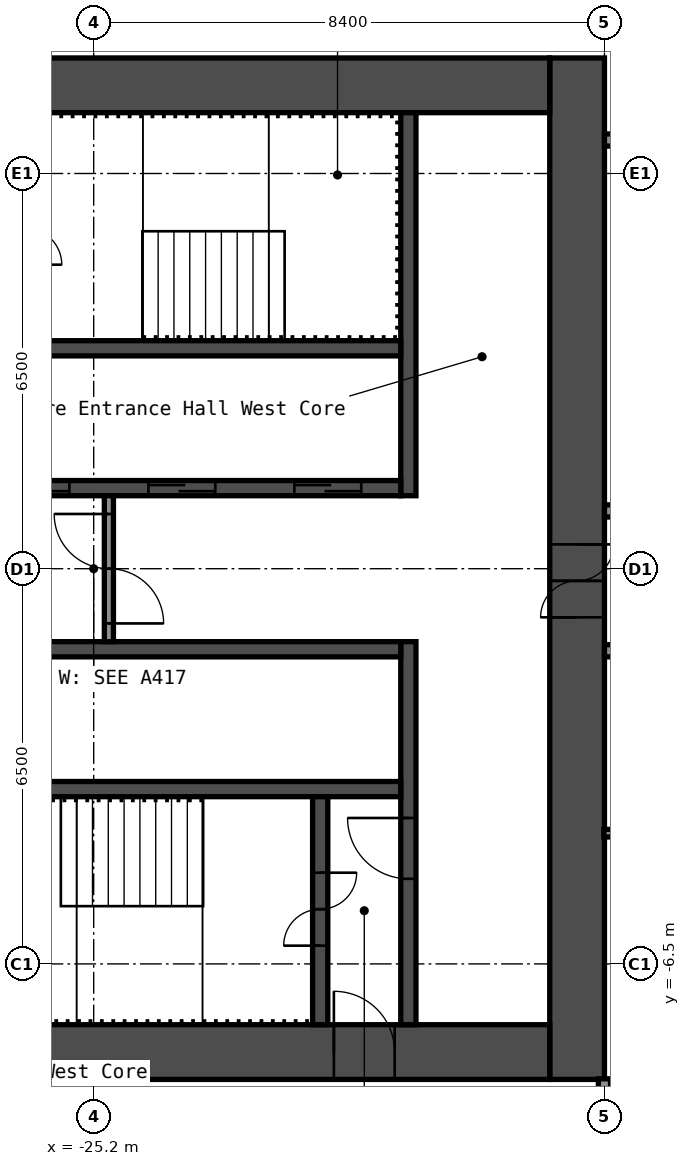
"""IFC4 building model, lengths in metres.
Left out: names, types, materials, properties, quantities, classifications, styles, units other than length and angle.
Written with IfcOpenShell. Run it as: python <this file> out.ifc"""

import sys

from ifc_helpers import new_model, si_unit, direction, frame, frame_2d, origin, place, context, subcontext, project, spatial, rectangle, extrude, element, fill, save


model = new_model("IFC4")
c1 = context("Model", 3, precision=1e-05, world=origin(), true_north=direction((0.0, 1.0)))
c2 = subcontext(c1, "Body", "Model", "MODEL_VIEW")
j1 = project(units=[si_unit("LENGTHUNIT", "METRE"), si_unit("PLANEANGLEUNIT", "RADIAN")], contexts=[c1])
p1 = place(None, origin())
s1 = spatial("IfcSite", under=j1, at=p1, CompositionType="ELEMENT")
p2 = place(p1, origin())
s2 = spatial("IfcBuilding", under=s1, at=p2, CompositionType="ELEMENT")
p3 = place(p2, frame((0.0, 0.0, 117.0)))
s3 = spatial("IfcBuildingStorey", under=s2, at=p3, CompositionType="ELEMENT", Elevation=117.0)
p4 = place(p3, frame((-17.25, -8.4, 0.0), z_axis=(0.0, 0.0, 1.0), x_axis=(0.0, 1.0, 0.0)))
e1 = element("IfcWall", 1, at=p4, inside=s3, PredefinedType="SHEAR", context=c2, shape_type="SweptSolid", body=[
    extrude(rectangle(XDim=16.8, YDim=0.9, at=frame_2d((8.4, 0.0))), origin(), (0.0, 0.0, 1.0), 2.9),
])
p5 = place(p4, frame((7.6, 0.0, 0.0)))
e2 = element("IfcOpeningElement", 2, at=p5, cuts=e1, PredefinedType="OPENING", context=c2, shape_type="SweptSolid", body=[
    extrude(rectangle(XDim=1.2, YDim=2.1, at=frame_2d((0.6, 1.05))), frame((0.0, 0.46, 0.0), z_axis=(0.0, -1.0, 0.0), x_axis=(1.0, 0.0, 0.0)), (0.0, 0.0, 1.0), 0.92),
])
p6 = place(p3, frame((-32.7, 7.95, 0.0), z_axis=(0.0, 0.0, 1.0), x_axis=(1.0, 0.0, 0.0)))
e3 = element("IfcWall", 3, at=p6, inside=s3, PredefinedType="SHEAR", context=c2, shape_type="SweptSolid", body=[
    extrude(rectangle(XDim=15.0, YDim=0.9, at=frame_2d((7.5, 0.0))), origin(), (0.0, 0.0, 1.0), 2.9),
])
p7 = place(p6, frame((3.4, 0.0, 0.0)))
e4 = element("IfcOpeningElement", 4, at=p7, cuts=e3, PredefinedType="OPENING", context=c2, shape_type="SweptSolid", body=[
    extrude(rectangle(XDim=1.2, YDim=2.1, at=frame_2d((0.6, 1.05))), frame((0.0, 0.46, 0.0), z_axis=(0.0, -1.0, 0.0), x_axis=(1.0, 0.0, 0.0)), (0.0, 0.0, 1.0), 0.92),
])
p8 = place(p6, frame((0.75, 0.0, 0.0)))
e5 = element("IfcOpeningElement", 5, at=p8, cuts=e3, PredefinedType="OPENING", context=c2, shape_type="SweptSolid", body=[
    extrude(rectangle(XDim=0.9, YDim=2.1, at=frame_2d((0.45, 1.05))), frame((0.0, 0.46, 0.0), z_axis=(0.0, -1.0, 0.0), x_axis=(1.0, 0.0, 0.0)), (0.0, 0.0, 1.0), 0.92),
])
p9 = place(p3, frame((-32.7, -7.95, 0.0), z_axis=(0.0, 0.0, 1.0), x_axis=(1.0, 0.0, 0.0)))
e6 = element("IfcWall", 6, at=p9, inside=s3, PredefinedType="SHEAR", context=c2, shape_type="SweptSolid", body=[
    extrude(rectangle(XDim=15.0, YDim=0.9, at=frame_2d((7.5, 0.0))), origin(), (0.0, 0.0, 1.0), 2.9),
])
p10 = place(p9, frame((11.45, 0.0, 0.0)))
e7 = element("IfcOpeningElement", 7, at=p10, cuts=e6, PredefinedType="OPENING", context=c2, shape_type="SweptSolid", body=[
    extrude(rectangle(XDim=1.0, YDim=2.1, at=frame_2d((0.5, 1.05))), frame((0.0, 0.46, 0.0), z_axis=(0.0, -1.0, 0.0), x_axis=(1.0, 0.0, 0.0)), (0.0, 0.0, 1.0), 0.92),
])
p11 = place(p3, frame((-20.025, 1.2, 0.0), z_axis=(0.0, 0.0, 1.0), x_axis=(0.0, 1.0, 0.0)))
e8 = element("IfcWall", 8, at=p11, inside=s3, PredefinedType="SHEAR", context=c2, shape_type="SweptSolid", body=[
    extrude(rectangle(XDim=6.3, YDim=0.25, at=frame_2d((3.15, 0.0))), origin(), (0.0, 0.0, 1.0), 2.9),
])
p12 = place(p3, frame((-20.025, -7.5, 0.0), z_axis=(0.0, 0.0, 1.0), x_axis=(0.0, 1.0, 0.0)))
e9 = element("IfcWall", 9, at=p12, inside=s3, PredefinedType="SHEAR", context=c2, shape_type="SweptSolid", body=[
    extrude(rectangle(XDim=6.3, YDim=0.25, at=frame_2d((3.15, 0.0))), origin(), (0.0, 0.0, 1.0), 2.9),
])
p13 = place(p12, frame((2.4, 0.0, 0.0)))
e10 = element("IfcOpeningElement", 10, at=p13, cuts=e9, PredefinedType="OPENING", context=c2, shape_type="SweptSolid", body=[
    extrude(rectangle(XDim=1.0, YDim=2.1, at=frame_2d((0.5, 1.05))), frame((0.0, 0.135, 0.0), z_axis=(0.0, -1.0, 0.0), x_axis=(1.0, 0.0, 0.0)), (0.0, 0.0, 1.0), 0.27),
])
p14 = place(p3, frame((-27.65, 1.325, 0.0), z_axis=(0.0, 0.0, 1.0), x_axis=(1.0, 0.0, 0.0)))
e11 = element("IfcWall", 11, at=p14, inside=s3, PredefinedType="SHEAR", context=c2, shape_type="SweptSolid", body=[
    extrude(rectangle(XDim=7.5, YDim=0.25, at=frame_2d((3.75, 0.0))), origin(), (0.0, 0.0, 1.0), 2.9),
])
p15 = place(p14, frame((5.75, 0.0, 0.0)))
e12 = element("IfcOpeningElement", 12, at=p15, cuts=e11, PredefinedType="OPENING", context=c2, shape_type="SweptSolid", body=[
    extrude(rectangle(XDim=1.1, YDim=2.1, at=frame_2d((0.55, 1.05))), frame((0.0, 0.135, 0.0), z_axis=(0.0, -1.0, 0.0), x_axis=(1.0, 0.0, 0.0)), (0.0, 0.0, 1.0), 0.27),
])
p16 = place(p14, frame((3.35, 0.0, 0.0)))
e13 = element("IfcOpeningElement", 13, at=p16, cuts=e11, PredefinedType="OPENING", context=c2, shape_type="SweptSolid", body=[
    extrude(rectangle(XDim=1.1, YDim=2.1, at=frame_2d((0.55, 1.05))), frame((0.0, 0.135, 0.0), z_axis=(0.0, -1.0, 0.0), x_axis=(1.0, 0.0, 0.0)), (0.0, 0.0, 1.0), 0.27),
])
p17 = place(p14, frame((0.95, 0.0, 0.0)))
e14 = element("IfcOpeningElement", 14, at=p17, cuts=e11, PredefinedType="OPENING", context=c2, shape_type="SweptSolid", body=[
    extrude(rectangle(XDim=1.1, YDim=2.1, at=frame_2d((0.55, 1.05))), frame((0.0, 0.135, 0.0), z_axis=(0.0, -1.0, 0.0), x_axis=(1.0, 0.0, 0.0)), (0.0, 0.0, 1.0), 0.27),
])
for number, where, z_axis, x_axis in (
    (15, (-27.65, 3.625, 0.0), (0.0, 0.0, 1.0), (1.0, 0.0, 0.0)),
    (16, (-27.65, -1.325, 0.0), (0.0, 0.0, 1.0), (1.0, 0.0, 0.0)),
    (17, (-27.65, -3.625, 0.0), (0.0, 0.0, 1.0), (1.0, 0.0, 0.0)),
):
    element("IfcWall", number, at=place(p3, frame(where, z_axis=z_axis, x_axis=x_axis)), inside=s3, PredefinedType="SHEAR", context=c2, shape_type="SweptSolid", body=[
        extrude(rectangle(XDim=7.5, YDim=0.25, at=frame_2d((3.75, 0.0))), origin(), (0.0, 0.0, 1.0), 2.9),
    ])
p18 = place(p3, frame((-21.475, -7.5, 0.0), z_axis=(0.0, 0.0, 1.0), x_axis=(0.0, 1.0, 0.0)))
e18 = element("IfcWall", 18, at=p18, inside=s3, PredefinedType="SHEAR", context=c2, shape_type="SweptSolid", body=[
    extrude(rectangle(XDim=3.75, YDim=0.25, at=frame_2d((1.875, 0.0))), origin(), (0.0, 0.0, 1.0), 2.9),
])
p19 = place(p18, frame((1.3, 0.0, 0.0)))
e19 = element("IfcOpeningElement", 19, at=p19, cuts=e18, PredefinedType="OPENING", context=c2, shape_type="SweptSolid", body=[
    extrude(rectangle(XDim=1.2, YDim=2.1, at=frame_2d((0.6, 1.05))), frame((0.0, 0.135, 0.0), z_axis=(0.0, -1.0, 0.0), x_axis=(1.0, 0.0, 0.0)), (0.0, 0.0, 1.0), 0.27),
])
p20 = place(p3, frame((-24.95, -1.2, 0.0), z_axis=(0.0, 0.0, 1.0), x_axis=(0.0, 1.0, 0.0)))
e20 = element("IfcWall", 20, at=p20, inside=s3, PredefinedType="PARTITIONING", context=c2, shape_type="SweptSolid", body=[
    extrude(rectangle(XDim=2.4, YDim=0.15, at=frame_2d((1.2, 0.0))), origin(), (0.0, 0.0, 1.0), 2.9),
])
p21 = place(p20, frame((0.3, 0.0, 0.0)))
e21 = element("IfcOpeningElement", 21, at=p21, cuts=e20, PredefinedType="OPENING", context=c2, shape_type="SweptSolid", body=[
    extrude(rectangle(XDim=1.8, YDim=2.1, at=frame_2d((0.9, 1.05))), frame((0.0, 0.085, 0.0), z_axis=(0.0, -1.0, 0.0), x_axis=(1.0, 0.0, 0.0)), (0.0, 0.0, 1.0), 0.17),
])
p22 = place(p3, frame((-16.81, -4.35, 0.0), z_axis=(0.0, 0.0, 1.0), x_axis=(1.0, 0.0, 0.0)))
e22 = element("IfcWall", 22, at=p22, inside=s3, PredefinedType="PARTITIONING", context=c2, shape_type="SweptSolid", body=[
    extrude(rectangle(XDim=2.448, YDim=0.125, at=frame_2d((1.224, 0.0))), origin(), (0.0, 0.0, 1.0), 2.9),
])
p23 = place(p3, frame((-16.8, -1.35, 0.0), z_axis=(0.0, 0.0, 1.0), x_axis=(1.0, 0.0, 0.0)))
e23 = element("IfcWall", 23, at=p23, inside=s3, PredefinedType="PARTITIONING", context=c2, shape_type="SweptSolid", body=[
    extrude(rectangle(XDim=33.6, YDim=0.2, at=frame_2d((16.8, 0.0))), origin(), (0.0, 0.0, 1.0), 2.9),
])
p24 = place(p23, frame((2.85, 0.0, 0.0)))
e24 = element("IfcOpeningElement", 24, at=p24, cuts=e23, PredefinedType="OPENING", context=c2, shape_type="SweptSolid", body=[
    extrude(rectangle(XDim=1.0, YDim=2.1, at=frame_2d((0.5, 1.05))), frame((0.0, 0.11, 0.0), z_axis=(0.0, -1.0, 0.0), x_axis=(1.0, 0.0, 0.0)), (0.0, 0.0, 1.0), 0.22),
])
p25 = place(p23, frame((4.55, 0.0, 0.0)))
e25 = element("IfcOpeningElement", 25, at=p25, cuts=e23, PredefinedType="OPENING", context=c2, shape_type="SweptSolid", body=[
    extrude(rectangle(XDim=1.0, YDim=2.1, at=frame_2d((0.5, 1.05))), frame((0.0, 0.11, 0.0), z_axis=(0.0, -1.0, 0.0), x_axis=(1.0, 0.0, 0.0)), (0.0, 0.0, 1.0), 0.22),
])
p26 = place(p23, frame((9.88, 0.0, 0.0)))
e26 = element("IfcOpeningElement", 26, at=p26, cuts=e23, PredefinedType="OPENING", context=c2, shape_type="SweptSolid", body=[
    extrude(rectangle(XDim=0.9, YDim=2.1, at=frame_2d((0.45, 1.05))), frame((0.0, 0.11, 0.0), z_axis=(0.0, -1.0, 0.0), x_axis=(1.0, 0.0, 0.0)), (0.0, 0.0, 1.0), 0.22),
])
p27 = place(p23, frame((14.08, 0.0, 0.0)))
e27 = element("IfcOpeningElement", 27, at=p27, cuts=e23, PredefinedType="OPENING", context=c2, shape_type="SweptSolid", body=[
    extrude(rectangle(XDim=0.9, YDim=2.1, at=frame_2d((0.45, 1.05))), frame((0.0, 0.11, 0.0), z_axis=(0.0, -1.0, 0.0), x_axis=(1.0, 0.0, 0.0)), (0.0, 0.0, 1.0), 0.22),
])
p28 = place(p23, frame((19.65, 0.0, 0.0)))
e28 = element("IfcOpeningElement", 28, at=p28, cuts=e23, PredefinedType="OPENING", context=c2, shape_type="SweptSolid", body=[
    extrude(rectangle(XDim=1.0, YDim=2.1, at=frame_2d((0.5, 1.05))), frame((0.0, 0.11, 0.0), z_axis=(0.0, -1.0, 0.0), x_axis=(1.0, 0.0, 0.0)), (0.0, 0.0, 1.0), 0.22),
])
p29 = place(p23, frame((21.35, 0.0, 0.0)))
e29 = element("IfcOpeningElement", 29, at=p29, cuts=e23, PredefinedType="OPENING", context=c2, shape_type="SweptSolid", body=[
    extrude(rectangle(XDim=1.0, YDim=2.1, at=frame_2d((0.5, 1.05))), frame((0.0, 0.11, 0.0), z_axis=(0.0, -1.0, 0.0), x_axis=(1.0, 0.0, 0.0)), (0.0, 0.0, 1.0), 0.22),
])
p30 = place(p23, frame((27.2, 0.0, 0.0)))
e30 = element("IfcOpeningElement", 30, at=p30, cuts=e23, PredefinedType="OPENING", context=c2, shape_type="SweptSolid", body=[
    extrude(rectangle(XDim=1.0, YDim=2.1, at=frame_2d((0.5, 1.05))), frame((0.0, 0.11, 0.0), z_axis=(0.0, -1.0, 0.0), x_axis=(1.0, 0.0, 0.0)), (0.0, 0.0, 1.0), 0.22),
])
p31 = place(p3, frame((-16.8, 0.95, 0.0), z_axis=(0.0, 0.0, 1.0), x_axis=(1.0, 0.0, 0.0)))
e31 = element("IfcWall", 31, at=p31, inside=s3, PredefinedType="PARTITIONING", context=c2, shape_type="SweptSolid", body=[
    extrude(rectangle(XDim=33.6, YDim=0.2, at=frame_2d((16.8, 0.0))), origin(), (0.0, 0.0, 1.0), 2.9),
])
p32 = place(p31, frame((10.47, 0.0, 0.0)))
e32 = element("IfcOpeningElement", 32, at=p32, cuts=e31, PredefinedType="OPENING", context=c2, shape_type="SweptSolid", body=[
    extrude(rectangle(XDim=0.9, YDim=2.1, at=frame_2d((0.45, 1.05))), frame((0.0, 0.11, 0.0), z_axis=(0.0, -1.0, 0.0), x_axis=(1.0, 0.0, 0.0)), (0.0, 0.0, 1.0), 0.22),
])
p33 = place(p31, frame((14.67, 0.0, 0.0)))
e33 = element("IfcOpeningElement", 33, at=p33, cuts=e31, PredefinedType="OPENING", context=c2, shape_type="SweptSolid", body=[
    extrude(rectangle(XDim=0.9, YDim=2.1, at=frame_2d((0.45, 1.05))), frame((0.0, 0.11, 0.0), z_axis=(0.0, -1.0, 0.0), x_axis=(1.0, 0.0, 0.0)), (0.0, 0.0, 1.0), 0.22),
])
p34 = place(p31, frame((26.43, 0.0, 0.0)))
e34 = element("IfcOpeningElement", 34, at=p34, cuts=e31, PredefinedType="OPENING", context=c2, shape_type="SweptSolid", body=[
    extrude(rectangle(XDim=0.9, YDim=2.1, at=frame_2d((0.45, 1.05))), frame((0.0, 0.11, 0.0), z_axis=(0.0, -1.0, 0.0), x_axis=(1.0, 0.0, 0.0)), (0.0, 0.0, 1.0), 0.22),
])
p35 = place(p31, frame((30.63, 0.0, 0.0)))
e35 = element("IfcOpeningElement", 35, at=p35, cuts=e31, PredefinedType="OPENING", context=c2, shape_type="SweptSolid", body=[
    extrude(rectangle(XDim=0.9, YDim=2.1, at=frame_2d((0.45, 1.05))), frame((0.0, 0.11, 0.0), z_axis=(0.0, -1.0, 0.0), x_axis=(1.0, 0.0, 0.0)), (0.0, 0.0, 1.0), 0.22),
])
p36 = place(p3, frame((-16.8, 7.05, 0.0), z_axis=(0.0, 0.0, 1.0), x_axis=(1.0, 0.0, 0.0)))
e36 = element("IfcWall", 36, at=p36, inside=s3, PredefinedType="PARTITIONING", context=c2, shape_type="SweptSolid", body=[
    extrude(rectangle(XDim=33.6, YDim=0.2, at=frame_2d((16.8, 0.0))), origin(), (0.0, 0.0, 1.0), 2.9),
])
p37 = place(p36, frame((1.315, 0.0, 0.0)))
e37 = element("IfcOpeningElement", 37, at=p37, cuts=e36, PredefinedType="OPENING", context=c2, shape_type="SweptSolid", body=[
    extrude(rectangle(XDim=0.9, YDim=2.1, at=frame_2d((0.45, 1.05))), frame((0.0, 0.11, 0.0), z_axis=(0.0, -1.0, 0.0), x_axis=(1.0, 0.0, 0.0)), (0.0, 0.0, 1.0), 0.22),
])
p38 = place(p36, frame((5.515, 0.0, 0.0)))
e38 = element("IfcOpeningElement", 38, at=p38, cuts=e36, PredefinedType="OPENING", context=c2, shape_type="SweptSolid", body=[
    extrude(rectangle(XDim=0.9, YDim=2.1, at=frame_2d((0.45, 1.05))), frame((0.0, 0.11, 0.0), z_axis=(0.0, -1.0, 0.0), x_axis=(1.0, 0.0, 0.0)), (0.0, 0.0, 1.0), 0.22),
])
p39 = place(p36, frame((18.955, 0.0, 0.0)))
e39 = element("IfcOpeningElement", 39, at=p39, cuts=e36, PredefinedType="OPENING", context=c2, shape_type="SweptSolid", body=[
    extrude(rectangle(XDim=0.9, YDim=2.1, at=frame_2d((0.45, 1.05))), frame((0.0, 0.11, 0.0), z_axis=(0.0, -1.0, 0.0), x_axis=(1.0, 0.0, 0.0)), (0.0, 0.0, 1.0), 0.22),
])
p40 = place(p36, frame((23.155, 0.0, 0.0)))
e40 = element("IfcOpeningElement", 40, at=p40, cuts=e36, PredefinedType="OPENING", context=c2, shape_type="SweptSolid", body=[
    extrude(rectangle(XDim=0.9, YDim=2.1, at=frame_2d((0.45, 1.05))), frame((0.0, 0.11, 0.0), z_axis=(0.0, -1.0, 0.0), x_axis=(1.0, 0.0, 0.0)), (0.0, 0.0, 1.0), 0.22),
])
p41 = place(p3, frame((-16.8, -15.55, 0.0), z_axis=(0.0, 0.0, 1.0), x_axis=(0.0, 1.0, 0.0)))
e41 = element("IfcWall", 41, at=p41, inside=s3, PredefinedType="PARTITIONING", context=c2, shape_type="SweptSolid", body=[
    extrude(rectangle(XDim=7.16, YDim=0.2, at=frame_2d((3.58, 0.0))), origin(), (0.0, 0.0, 1.0), 2.9),
])
p42 = place(p5, origin())
e42 = element("IfcDoor", 42, at=p42, inside=s3, OperationType="DOUBLE_DOOR_SINGLE_SWING", PredefinedType="DOOR", context=c2, shape_type="SweptSolid", body=[
    extrude(rectangle(XDim=1.2, YDim=2.1, at=frame_2d((0.6, 1.05))), frame((0.0, 0.025, 0.0), z_axis=(0.0, -1.0, 0.0), x_axis=(1.0, 0.0, 0.0)), (0.0, 0.0, 1.0), 0.05),
])
fill(e2, e42)
p43 = place(p10, origin())
e43 = element("IfcDoor", 43, at=p43, inside=s3, OperationType="SINGLE_SWING_RIGHT", PredefinedType="DOOR", context=c2, shape_type="SweptSolid", body=[
    extrude(rectangle(XDim=1.0, YDim=2.1, at=frame_2d((0.5, 1.05))), frame((0.0, 0.025, 0.0), z_axis=(0.0, -1.0, 0.0), x_axis=(1.0, 0.0, 0.0)), (0.0, 0.0, 1.0), 0.05),
])
fill(e7, e43)
p44 = place(p19, origin())
e44 = element("IfcDoor", 44, at=p44, inside=s3, OperationType="DOUBLE_DOOR_SINGLE_SWING", PredefinedType="DOOR", context=c2, shape_type="SweptSolid", body=[
    extrude(rectangle(XDim=1.2, YDim=2.1, at=frame_2d((0.6, 1.05))), frame((0.0, 0.025, 0.0), z_axis=(0.0, -1.0, 0.0), x_axis=(1.0, 0.0, 0.0)), (0.0, 0.0, 1.0), 0.05),
])
fill(e19, e44)
p45 = place(p13, origin())
e45 = element("IfcDoor", 45, at=p45, inside=s3, OperationType="SINGLE_SWING_LEFT", PredefinedType="DOOR", context=c2, shape_type="SweptSolid", body=[
    extrude(rectangle(XDim=1.0, YDim=2.1, at=frame_2d((0.5, 1.05))), frame((0.0, 0.025, 0.0), z_axis=(0.0, -1.0, 0.0), x_axis=(1.0, 0.0, 0.0)), (0.0, 0.0, 1.0), 0.05),
])
fill(e10, e45)
p46 = place(p21, origin())
e46 = element("IfcDoor", 46, at=p46, inside=s3, OperationType="DOUBLE_DOOR_SINGLE_SWING", PredefinedType="DOOR", context=c2, shape_type="SweptSolid", body=[
    extrude(rectangle(XDim=1.8, YDim=2.1, at=frame_2d((0.9, 1.05))), frame((0.0, 0.025, 0.0), z_axis=(0.0, -1.0, 0.0), x_axis=(1.0, 0.0, 0.0)), (0.0, 0.0, 1.0), 0.05),
])
fill(e21, e46)
p47 = place(p15, origin())
e47 = element("IfcDoor", 47, at=p47, inside=s3, OperationType="DOUBLE_DOOR_SLIDING", PredefinedType="DOOR", context=c2, shape_type="SweptSolid", body=[
    extrude(rectangle(XDim=1.1, YDim=2.1, at=frame_2d((0.55, 1.05))), frame((0.0, 0.025, 0.0), z_axis=(0.0, -1.0, 0.0), x_axis=(1.0, 0.0, 0.0)), (0.0, 0.0, 1.0), 0.05),
])
fill(e12, e47)
p48 = place(p16, origin())
e48 = element("IfcDoor", 48, at=p48, inside=s3, OperationType="DOUBLE_DOOR_SLIDING", PredefinedType="DOOR", context=c2, shape_type="SweptSolid", body=[
    extrude(rectangle(XDim=1.1, YDim=2.1, at=frame_2d((0.55, 1.05))), frame((0.0, 0.025, 0.0), z_axis=(0.0, -1.0, 0.0), x_axis=(1.0, 0.0, 0.0)), (0.0, 0.0, 1.0), 0.05),
])
fill(e13, e48)
p49 = place(p17, origin())
e49 = element("IfcDoor", 49, at=p49, inside=s3, OperationType="DOUBLE_DOOR_SLIDING", PredefinedType="DOOR", context=c2, shape_type="SweptSolid", body=[
    extrude(rectangle(XDim=1.1, YDim=2.1, at=frame_2d((0.55, 1.05))), frame((0.0, 0.025, 0.0), z_axis=(0.0, -1.0, 0.0), x_axis=(1.0, 0.0, 0.0)), (0.0, 0.0, 1.0), 0.05),
])
fill(e14, e49)
save(model, sys.argv[1])
